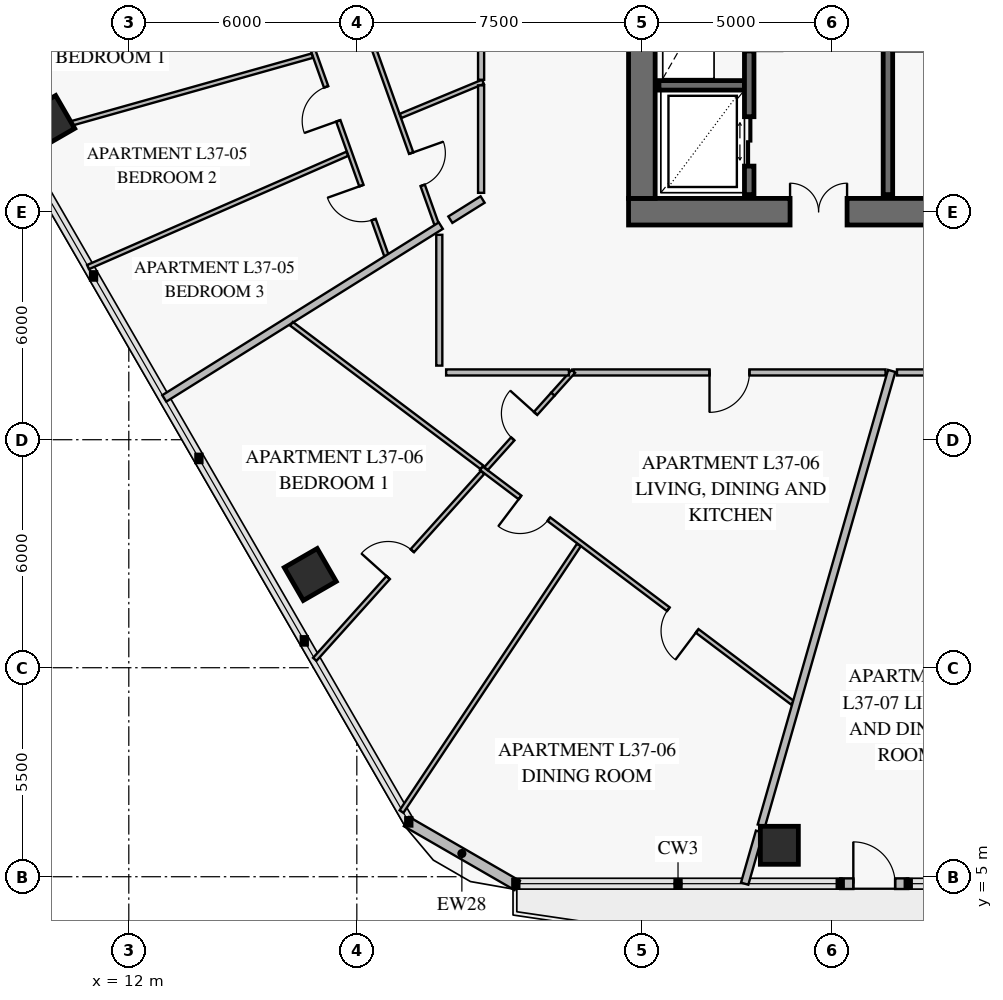
"""IFC4 building model, lengths in metres.
Left out: names, types, materials, properties, quantities, classifications, styles, units other than length and angle.
Written with IfcOpenShell. Run it as: python <this file> out.ifc"""

import sys

from ifc_helpers import new_model, si_unit, direction, frame, frame_2d, origin, origin_2d, place, context, subcontext, project, spatial, rectangle, extrude, element, fill, save


model = new_model("IFC4")
c1 = context("Model", 3, precision=1e-05, world=origin(), true_north=direction((0.0, 1.0)))
c2 = subcontext(c1, "Body", "Model", "MODEL_VIEW")
j1 = project(units=[si_unit("LENGTHUNIT", "METRE"), si_unit("PLANEANGLEUNIT", "RADIAN")], contexts=[c1])
p1 = place(None, origin())
s1 = spatial("IfcSite", under=j1, at=p1, CompositionType="ELEMENT")
p2 = place(p1, origin())
s2 = spatial("IfcBuilding", under=s1, at=p2, CompositionType="ELEMENT")
p3 = place(p2, frame((0.0, 0.0, 150.4)))
s3 = spatial("IfcBuildingStorey", under=s2, at=p3, CompositionType="ELEMENT", Elevation=150.4)
p4 = place(p3, frame((25.15, 22.5, 0.0), z_axis=(0.0, 0.0, 1.0), x_axis=(1.0, 0.0, 0.0)))
e1 = element("IfcWall", 1, at=p4, inside=s3, PredefinedType="SHEAR", context=c2, shape_type="SweptSolid", body=[
    extrude(rectangle(XDim=9.9, YDim=0.7, at=frame_2d((4.95, 0.0))), origin(), (0.0, 0.0, 1.0), 3.8),
])
p5 = place(p4, frame((4.25, 0.0, 0.0)))
e2 = element("IfcOpeningElement", 2, at=p5, cuts=e1, PredefinedType="OPENING", context=c2, shape_type="SweptSolid", body=[
    extrude(rectangle(XDim=1.5, YDim=2.15, at=frame_2d((0.75, 1.075))), frame((0.0, 0.362, 0.0), z_axis=(0.0, -1.0, 0.0), x_axis=(1.0, 0.0, 0.0)), (0.0, 0.0, 1.0), 0.724),
])
p6 = place(p3, frame((25.5, 22.85, 0.0), z_axis=(0.0, 0.0, 1.0), x_axis=(0.0, 1.0, 0.0)))
e3 = element("IfcWall", 3, at=p6, inside=s3, PredefinedType="SHEAR", context=c2, shape_type="SweptSolid", body=[
    extrude(rectangle(XDim=18.3, YDim=0.7, at=frame_2d((9.15, 0.0))), origin(), (0.0, 0.0, 1.0), 3.8),
])
p7 = place(p6, frame((8.9, 0.0, 0.0)))
e4 = element("IfcOpeningElement", 4, at=p7, cuts=e3, PredefinedType="OPENING", context=c2, shape_type="SweptSolid", body=[
    extrude(rectangle(XDim=1.1, YDim=2.15, at=frame_2d((0.55, 1.075))), frame((0.0, 0.362, 0.0), z_axis=(0.0, -1.0, 0.0), x_axis=(1.0, 0.0, 0.0)), (0.0, 0.0, 1.0), 0.724),
])
for number, where, z_axis, x_axis in (
    (5, (9.892, 24.874, 0.0), (0.0, 0.0, 1.0), (0.5, -0.866, 0.0)),
    (6, (16.774, 12.953, 0.0), (0.0, 0.0, 1.0), (0.5, -0.866, 0.0)),
    (7, (29.118, 5.827, 0.0), (0.0, 0.0, 1.0), (1.0, 0.0, 0.0)),
):
    element("IfcColumn", number, at=place(p3, frame(where, z_axis=z_axis, x_axis=x_axis)), inside=s3, PredefinedType="COLUMN", context=c2, shape_type="SweptSolid", body=[
        extrude(rectangle(XDim=1.0, YDim=1.0, at=origin_2d()), origin(), (0.0, 0.0, 1.0), 3.55),
    ])
p8 = place(p3, frame((32.51, 4.817, 0.0), z_axis=(0.0, 0.0, 1.0), x_axis=(-1.0, 0.0, 0.0)))
e8 = element("IfcWall", 8, at=p8, inside=s3, PredefinedType="SOLIDWALL", context=c2, shape_type="SweptSolid", body=[
    extrude(rectangle(XDim=1.79, YDim=0.28, at=frame_2d((0.895, 0.0))), origin(), (0.0, 0.0, 1.0), 3.55),
])
p9 = place(p8, frame((0.345, 0.0, 0.0)))
e9 = element("IfcOpeningElement", 9, at=p9, cuts=e8, PredefinedType="OPENING", context=c2, shape_type="SweptSolid", body=[
    extrude(rectangle(XDim=1.1, YDim=2.2, at=frame_2d((0.55, 1.1))), frame((0.0, 0.152, 0.0), z_axis=(0.0, -1.0, 0.0), x_axis=(1.0, 0.0, 0.0)), (0.0, 0.0, 1.0), 0.304),
])
p10 = place(p3, frame((22.221, 4.769, 0.0), z_axis=(0.0, 0.0, 1.0), x_axis=(-0.866020068361, 0.500009241111, 0.0)))
e10 = element("IfcWall", 10, at=p10, inside=s3, PredefinedType="SOLIDWALL", context=c2, shape_type="SweptSolid", body=[
    extrude(rectangle(XDim=3.365, YDim=0.28, at=frame_2d((1.683, 0.0))), origin(), (0.0, 0.0, 1.0), 3.55),
])
p11 = place(p3, frame((25.95, 25.825, 0.0), z_axis=(0.0, 0.0, 1.0), x_axis=(1.0, 0.0, 0.0)))
e11 = element("IfcWall", 11, at=p11, inside=s3, PredefinedType="SOLIDWALL", context=c2, shape_type="SweptSolid", body=[
    extrude(rectangle(XDim=2.25, YDim=0.25, at=frame_2d((1.125, 0.0))), origin(), (0.0, 0.0, 1.0), 3.8),
])
p12 = place(p3, frame((28.325, 22.95, 0.0), z_axis=(0.0, 0.0, 1.0), x_axis=(0.0, 1.0, 0.0)))
e12 = element("IfcWall", 12, at=p12, inside=s3, PredefinedType="SOLIDWALL", context=c2, shape_type="SweptSolid", body=[
    extrude(rectangle(XDim=8.2, YDim=0.25, at=frame_2d((4.1, 0.0))), origin(), (0.0, 0.0, 1.0), 3.8),
])
p13 = place(p12, frame((0.75, 0.0, 0.0)))
e13 = element("IfcOpeningElement", 13, at=p13, cuts=e12, PredefinedType="OPENING", context=c2, shape_type="SweptSolid", body=[
    extrude(rectangle(XDim=1.3, YDim=2.3, at=frame_2d((0.65, 1.15))), frame((0.0, 0.137, 0.0), z_axis=(0.0, -1.0, 0.0), x_axis=(1.0, 0.0, 0.0)), (0.0, 0.0, 1.0), 0.274),
])
p14 = place(p12, frame((3.78, 0.0, 0.0)))
e14 = element("IfcOpeningElement", 14, at=p14, cuts=e12, PredefinedType="OPENING", context=c2, shape_type="SweptSolid", body=[
    extrude(rectangle(XDim=0.9, YDim=2.1, at=frame_2d((0.45, 1.05))), frame((0.0, 0.137, 0.0), z_axis=(0.0, -1.0, 0.0), x_axis=(1.0, 0.0, 0.0)), (0.0, 0.0, 1.0), 0.274),
])
p15 = place(p12, frame((6.5, 0.0, 0.0)))
e15 = element("IfcOpeningElement", 15, at=p15, cuts=e12, PredefinedType="OPENING", context=c2, shape_type="SweptSolid", body=[
    extrude(rectangle(XDim=0.9, YDim=2.1, at=frame_2d((0.45, 1.05))), frame((0.0, 0.137, 0.0), z_axis=(0.0, -1.0, 0.0), x_axis=(1.0, 0.0, 0.0)), (0.0, 0.0, 1.0), 0.274),
])
p16 = place(p3, frame((31.975, 22.95, 0.0), z_axis=(0.0, 0.0, 1.0), x_axis=(0.0, 1.0, 0.0)))
e16 = element("IfcWall", 16, at=p16, inside=s3, PredefinedType="SOLIDWALL", context=c2, shape_type="SweptSolid", body=[
    extrude(rectangle(XDim=8.2, YDim=0.25, at=frame_2d((4.1, 0.0))), origin(), (0.0, 0.0, 1.0), 3.8),
])
p17 = place(p3, frame((17.46, 29.555, 0.0), z_axis=(0.0, 0.0, 1.0), x_axis=(0.336444483984, -0.941703302106, 0.0)))
e17 = element("IfcWall", 17, at=p17, inside=s3, PredefinedType="PARTITIONING", context=c2, shape_type="SweptSolid", body=[
    extrude(rectangle(XDim=7.87, YDim=0.12, at=frame_2d((3.935, 0.0))), origin(), (0.0, 0.0, 1.0), 2.9),
])
p18 = place(p17, frame((1.997, 0.0, 0.0)))
e18 = element("IfcOpeningElement", 18, at=p18, cuts=e17, PredefinedType="OPENING", context=c2, shape_type="SweptSolid", body=[
    extrude(rectangle(XDim=0.95, YDim=2.1, at=frame_2d((0.475, 1.05))), frame((0.0, 0.072, 0.0), z_axis=(0.0, -1.0, 0.0), x_axis=(1.0, 0.0, 0.0)), (0.0, 0.0, 1.0), 0.144),
])
p19 = place(p17, frame((5.855, 0.0, 0.0)))
e19 = element("IfcOpeningElement", 19, at=p19, cuts=e17, PredefinedType="OPENING", context=c2, shape_type="SweptSolid", body=[
    extrude(rectangle(XDim=0.9, YDim=2.1, at=frame_2d((0.45, 1.05))), frame((0.0, 0.072, 0.0), z_axis=(0.0, -1.0, 0.0), x_axis=(1.0, 0.0, 0.0)), (0.0, 0.0, 1.0), 0.144),
])
p20 = place(p3, frame((15.921, 29.343, 0.0), z_axis=(0.0, 0.0, 1.0), x_axis=(0.336440023532, -0.941704895689, 0.0)))
e20 = element("IfcWall", 20, at=p20, inside=s3, PredefinedType="PARTITIONING", context=c2, shape_type="SweptSolid", body=[
    extrude(rectangle(XDim=8.507, YDim=0.12, at=frame_2d((4.253, 0.0))), origin(), (0.0, 0.0, 1.0), 2.9),
])
p21 = place(p20, frame((1.019, 0.0, 0.0)))
e21 = element("IfcOpeningElement", 21, at=p21, cuts=e20, PredefinedType="OPENING", context=c2, shape_type="SweptSolid", body=[
    extrude(rectangle(XDim=0.95, YDim=2.1, at=frame_2d((0.475, 1.05))), frame((0.0, 0.072, 0.0), z_axis=(0.0, -1.0, 0.0), x_axis=(1.0, 0.0, 0.0)), (0.0, 0.0, 1.0), 0.144),
])
p22 = place(p20, frame((3.779, 0.0, 0.0)))
e22 = element("IfcOpeningElement", 22, at=p22, cuts=e20, PredefinedType="OPENING", context=c2, shape_type="SweptSolid", body=[
    extrude(rectangle(XDim=0.95, YDim=2.1, at=frame_2d((0.475, 1.05))), frame((0.0, 0.072, 0.0), z_axis=(0.0, -1.0, 0.0), x_axis=(1.0, 0.0, 0.0)), (0.0, 0.0, 1.0), 0.144),
])
p23 = place(p20, frame((6.538, 0.0, 0.0)))
e23 = element("IfcOpeningElement", 23, at=p23, cuts=e20, PredefinedType="OPENING", context=c2, shape_type="SweptSolid", body=[
    extrude(rectangle(XDim=0.95, YDim=2.1, at=frame_2d((0.475, 1.05))), frame((0.0, 0.072, 0.0), z_axis=(0.0, -1.0, 0.0), x_axis=(1.0, 0.0, 0.0)), (0.0, 0.0, 1.0), 0.144),
])
p24 = place(p3, frame((21.274, 15.749, 0.0), z_axis=(0.0, 0.0, 1.0), x_axis=(0.798637831458, -0.601811942524, 0.0)))
e24 = element("IfcWall", 24, at=p24, inside=s3, PredefinedType="PARTITIONING", context=c2, shape_type="SweptSolid", body=[
    extrude(rectangle(XDim=10.253, YDim=0.12, at=frame_2d((5.126, 0.0))), origin(), (0.0, 0.0, 1.0), 3.55),
])
p25 = place(p24, frame((1.277, 0.0, 0.0)))
e25 = element("IfcOpeningElement", 25, at=p25, cuts=e24, PredefinedType="OPENING", context=c2, shape_type="SweptSolid", body=[
    extrude(rectangle(XDim=0.95, YDim=2.1, at=frame_2d((0.475, 1.05))), frame((0.0, 0.072, 0.0), z_axis=(0.0, -1.0, 0.0), x_axis=(1.0, 0.0, 0.0)), (0.0, 0.0, 1.0), 0.144),
])
p26 = place(p24, frame((6.163, 0.0, 0.0)))
e26 = element("IfcOpeningElement", 26, at=p26, cuts=e24, PredefinedType="OPENING", context=c2, shape_type="SweptSolid", body=[
    extrude(rectangle(XDim=0.95, YDim=2.1, at=frame_2d((0.475, 1.05))), frame((0.0, 0.072, 0.0), z_axis=(0.0, -1.0, 0.0), x_axis=(1.0, 0.0, 0.0)), (0.0, 0.0, 1.0), 0.144),
])
p27 = place(p3, frame((23.16, 17.7, 0.0), z_axis=(0.0, 0.0, 1.0), x_axis=(-0.668093965752, -0.744076913313, 0.0)))
e27 = element("IfcWall", 27, at=p27, inside=s3, PredefinedType="PARTITIONING", context=c2, shape_type="SweptSolid", body=[
    extrude(rectangle(XDim=2.635, YDim=0.12, at=frame_2d((1.317, 0.0))), origin(), (0.0, 0.0, 1.0), 3.55),
])
p28 = place(p27, frame((0.683, 0.0, 0.0)))
e28 = element("IfcOpeningElement", 28, at=p28, cuts=e27, PredefinedType="OPENING", context=c2, shape_type="SweptSolid", body=[
    extrude(rectangle(XDim=0.9, YDim=2.1, at=frame_2d((0.45, 1.05))), frame((0.0, 0.072, 0.0), z_axis=(0.0, -1.0, 0.0), x_axis=(1.0, 0.0, 0.0)), (0.0, 0.0, 1.0), 0.144),
])
p29 = place(p3, frame((21.309, 15.638, 0.0), z_axis=(0.0, 0.0, 1.0), x_axis=(-0.668094908061, -0.744076067229, 0.0)))
e29 = element("IfcWall", 29, at=p29, inside=s3, PredefinedType="PARTITIONING", context=c2, shape_type="SweptSolid", body=[
    extrude(rectangle(XDim=6.61, YDim=0.12, at=frame_2d((3.305, 0.0))), origin(), (0.0, 0.0, 1.0), 2.87),
])
p30 = place(p29, frame((2.768, 0.0, 0.0)))
e30 = element("IfcOpeningElement", 30, at=p30, cuts=e29, PredefinedType="OPENING", context=c2, shape_type="SweptSolid", body=[
    extrude(rectangle(XDim=0.95, YDim=2.1, at=frame_2d((0.475, 1.05))), frame((0.0, 0.072, 0.0), z_axis=(0.0, -1.0, 0.0), x_axis=(1.0, 0.0, 0.0)), (0.0, 0.0, 1.0), 0.144),
])
p31 = place(p3, frame((23.699, 18.27, 0.0), z_axis=(0.0, 0.0, 1.0), x_axis=(1.0, 0.0, 0.0)))
e31 = element("IfcWall", 31, at=p31, inside=s3, PredefinedType="PARTITIONING", context=c2, shape_type="SweptSolid", body=[
    extrude(rectangle(XDim=8.213, YDim=0.16, at=frame_2d((4.106, 0.0))), origin(), (0.0, 0.0, 1.0), 3.55),
])
p32 = place(p31, frame((3.582, 0.0, 0.0)))
e32 = element("IfcOpeningElement", 32, at=p32, cuts=e31, PredefinedType="OPENING", context=c2, shape_type="SweptSolid", body=[
    extrude(rectangle(XDim=1.05, YDim=2.15, at=frame_2d((0.525, 1.075))), frame((0.0, 0.092, 0.0), z_axis=(0.0, -1.0, 0.0), x_axis=(1.0, 0.0, 0.0)), (0.0, 0.0, 1.0), 0.184),
])
p33 = place(p3, frame((32.213, 18.27, 0.0), z_axis=(0.0, 0.0, 1.0), x_axis=(1.0, 0.0, 0.0)))
e33 = element("IfcWall", 33, at=p33, inside=s3, PredefinedType="PARTITIONING", context=c2, shape_type="SweptSolid", body=[
    extrude(rectangle(XDim=3.244, YDim=0.16, at=frame_2d((1.622, 0.0))), origin(), (0.0, 0.0, 1.0), 2.9),
])
p34 = place(p33, frame((1.097, 0.0, 0.0)))
e34 = element("IfcOpeningElement", 34, at=p34, cuts=e33, PredefinedType="OPENING", context=c2, shape_type="SweptSolid", body=[
    extrude(rectangle(XDim=1.05, YDim=2.15, at=frame_2d((0.525, 1.075))), frame((0.0, 0.092, 0.0), z_axis=(0.0, -1.0, 0.0), x_axis=(1.0, 0.0, 0.0)), (0.0, 0.0, 1.0), 0.184),
])
p35 = place(p3, frame((21.32, 25.919, 0.0), z_axis=(0.0, 0.0, 1.0), x_axis=(-0.923865947443, -0.382716227975, 0.0)))
e35 = element("IfcWall", 35, at=p35, inside=s3, PredefinedType="PARTITIONING", context=c2, shape_type="SweptSolid", body=[
    extrude(rectangle(XDim=2.347, YDim=0.12, at=frame_2d((1.173, 0.0))), origin(), (0.0, 0.0, 1.0), 3.55),
])
p36 = place(p3, frame((16.827, 26.606, 0.0), z_axis=(0.0, 0.0, 1.0), x_axis=(-0.96262766067, -0.270828334767, 0.0)))
e36 = element("IfcWall", 36, at=p36, inside=s3, PredefinedType="PARTITIONING", context=c2, shape_type="SweptSolid", body=[
    extrude(rectangle(XDim=6.664, YDim=0.12, at=frame_2d((3.332, 0.0))), origin(), (0.0, 0.0, 1.0), 2.9),
])
p37 = place(p3, frame((17.749, 24.024, 0.0), z_axis=(0.0, 0.0, 1.0), x_axis=(-0.916318302779, -0.40045070607, 0.0)))
e37 = element("IfcWall", 37, at=p37, inside=s3, PredefinedType="PARTITIONING", context=c2, shape_type="SweptSolid", body=[
    extrude(rectangle(XDim=7.446, YDim=0.12, at=frame_2d((3.723, 0.0))), origin(), (0.0, 0.0, 1.0), 2.87),
])
p38 = place(p3, frame((21.31, 22.821, 0.0), z_axis=(0.0, 0.0, 1.0), x_axis=(-0.848039384523, -0.529933205506, 0.0)))
e38 = element("IfcWall", 38, at=p38, inside=s3, PredefinedType="PARTITIONING", context=c2, shape_type="SweptSolid", body=[
    extrude(rectangle(XDim=1.001, YDim=0.2, at=frame_2d((0.501, 0.0))), origin(), (0.0, 0.0, 1.0), 3.55),
])
p39 = place(p3, frame((20.21, 22.133, 0.0), z_axis=(0.0, 0.0, 1.0), x_axis=(-0.848051050333, -0.529914536534, 0.0)))
e39 = element("IfcWall", 39, at=p39, inside=s3, PredefinedType="PARTITIONING", context=c2, shape_type="SweptSolid", body=[
    extrude(rectangle(XDim=8.58, YDim=0.2, at=frame_2d((4.29, 0.0))), origin(), (0.0, 0.0, 1.0), 2.87),
])
p40 = place(p3, frame((23.843, 13.729, 0.0), z_axis=(0.0, 0.0, 1.0), x_axis=(-0.553937627107, -0.832558169304, 0.0)))
e40 = element("IfcWall", 40, at=p40, inside=s3, PredefinedType="PARTITIONING", context=c2, shape_type="SweptSolid", body=[
    extrude(rectangle(XDim=8.425, YDim=0.12, at=frame_2d((4.212, 0.0))), origin(), (0.0, 0.0, 1.0), 2.87),
])
p41 = place(p3, frame((23.699, 18.3, 0.0), z_axis=(0.0, 0.0, 1.0), x_axis=(-0.668077469972, -0.744091724262, 0.0)))
e41 = element("IfcWall", 41, at=p41, inside=s3, PredefinedType="PARTITIONING", context=c2, shape_type="SweptSolid", body=[
    extrude(rectangle(XDim=0.806, YDim=0.12, at=frame_2d((0.403, 0.0))), origin(), (0.0, 0.0, 1.0), 3.55),
])
p42 = place(p3, frame((16.281, 19.551, 0.0), z_axis=(0.0, 0.0, 1.0), x_axis=(0.798630108131, -0.60182219167, 0.0)))
e42 = element("IfcWall", 42, at=p42, inside=s3, PredefinedType="PARTITIONING", context=c2, shape_type="SweptSolid", body=[
    extrude(rectangle(XDim=6.276, YDim=0.12, at=frame_2d((3.138, 0.0))), origin(), (0.0, 0.0, 1.0), 2.9),
])
p43 = place(p3, frame((32.074, 18.31, 0.0), z_axis=(0.0, 0.0, 1.0), x_axis=(-0.275640788156, -0.961260711724, 0.0)))
e43 = element("IfcWall", 43, at=p43, inside=s3, PredefinedType="PARTITIONING", context=c2, shape_type="SweptSolid", body=[
    extrude(rectangle(XDim=12.445, YDim=0.2, at=frame_2d((6.223, 0.0))), origin(), (0.0, 0.0, 1.0), 3.55),
])
p44 = place(p3, frame((28.598, 6.186, 0.0), z_axis=(0.0, 0.0, 1.0), x_axis=(-0.275581158173, -0.961277808576, 0.0)))
e44 = element("IfcWall", 44, at=p44, inside=s3, PredefinedType="PARTITIONING", context=c2, shape_type="SweptSolid", body=[
    extrude(rectangle(XDim=1.425, YDim=0.2, at=frame_2d((0.712, 0.0))), origin(), (0.0, 0.0, 1.0), 2.87),
])
p45 = place(p3, frame((21.27, 29.908, 0.0), z_axis=(0.0, 0.0, 1.0), x_axis=(0.0, -1.0, 0.0)))
e45 = element("IfcWall", 45, at=p45, inside=s3, PredefinedType="PARTITIONING", context=c2, shape_type="SweptSolid", body=[
    extrude(rectangle(XDim=3.937, YDim=0.16, at=frame_2d((1.968, 0.0))), origin(), (0.0, 0.0, 1.0), 2.9),
])
p46 = place(p3, frame((21.27, 25.825, 0.0), z_axis=(0.0, 0.0, 1.0), x_axis=(0.0, -1.0, 0.0)))
e46 = element("IfcWall", 46, at=p46, inside=s3, PredefinedType="PARTITIONING", context=c2, shape_type="SweptSolid", body=[
    extrude(rectangle(XDim=2.828, YDim=0.16, at=frame_2d((1.414, 0.0))), origin(), (0.0, 0.0, 1.0), 3.55),
])
p47 = place(p3, frame((20.17, 21.892, 0.0), z_axis=(0.0, 0.0, 1.0), x_axis=(0.0, -1.0, 0.0)))
e47 = element("IfcWall", 47, at=p47, inside=s3, PredefinedType="PARTITIONING", context=c2, shape_type="SweptSolid", body=[
    extrude(rectangle(XDim=3.442, YDim=0.16, at=frame_2d((1.721, 0.0))), origin(), (0.0, 0.0, 1.0), 3.15),
])
p48 = place(p3, frame((20.35, 18.27, 0.0), z_axis=(0.0, 0.0, 1.0), x_axis=(1.0, 0.0, 0.0)))
e48 = element("IfcWall", 48, at=p48, inside=s3, PredefinedType="PARTITIONING", context=c2, shape_type="SweptSolid", body=[
    extrude(rectangle(XDim=3.231, YDim=0.16, at=frame_2d((1.615, 0.0))), origin(), (0.0, 0.0, 1.0), 2.9),
])
p49 = place(p9, frame((1.1, 0.0, 0.0), z_axis=(0.0, 0.0, 1.0), x_axis=(-1.0, 0.0, 0.0)))
e49 = element("IfcDoor", 49, at=p49, inside=s3, OperationType="SINGLE_SWING_LEFT", PredefinedType="DOOR", context=c2, shape_type="SweptSolid", body=[
    extrude(rectangle(XDim=1.1, YDim=2.2, at=frame_2d((0.55, 1.1))), frame((0.0, 0.025, 0.0), z_axis=(0.0, -1.0, 0.0), x_axis=(1.0, 0.0, 0.0)), (0.0, 0.0, 1.0), 0.05),
])
fill(e9, e49)
p50 = place(p5, origin())
e50 = element("IfcDoor", 50, at=p50, inside=s3, OperationType="DOUBLE_DOOR_SINGLE_SWING", PredefinedType="DOOR", context=c2, shape_type="SweptSolid", body=[
    extrude(rectangle(XDim=1.5, YDim=2.15, at=frame_2d((0.75, 1.075))), frame((0.0, 0.025, 0.0), z_axis=(0.0, -1.0, 0.0), x_axis=(1.0, 0.0, 0.0)), (0.0, 0.0, 1.0), 0.05),
])
fill(e2, e50)
p51 = place(p13, frame((1.3, 0.0, 0.0), z_axis=(0.0, 0.0, 1.0), x_axis=(-1.0, 0.0, 0.0)))
e51 = element("IfcDoor", 51, at=p51, inside=s3, OperationType="DOUBLE_DOOR_SLIDING", PredefinedType="DOOR", context=c2, shape_type="SweptSolid", body=[
    extrude(rectangle(XDim=1.3, YDim=2.3, at=frame_2d((0.65, 1.15))), frame((0.0, 0.025, 0.0), z_axis=(0.0, -1.0, 0.0), x_axis=(1.0, 0.0, 0.0)), (0.0, 0.0, 1.0), 0.05),
])
fill(e13, e51)
p52 = place(p19, origin())
e52 = element("IfcDoor", 52, at=p52, inside=s3, OperationType="SINGLE_SWING_LEFT", PredefinedType="DOOR", context=c2, shape_type="SweptSolid", body=[
    extrude(rectangle(XDim=0.9, YDim=2.1, at=frame_2d((0.45, 1.05))), frame((0.0, 0.025, 0.0), z_axis=(0.0, -1.0, 0.0), x_axis=(1.0, 0.0, 0.0)), (0.0, 0.0, 1.0), 0.05),
])
fill(e19, e52)
p53 = place(p22, frame((0.95, 0.0, 0.0), z_axis=(0.0, 0.0, 1.0), x_axis=(-1.0, 0.0, 0.0)))
e53 = element("IfcDoor", 53, at=p53, inside=s3, OperationType="SINGLE_SWING_LEFT", PredefinedType="DOOR", context=c2, shape_type="SweptSolid", body=[
    extrude(rectangle(XDim=0.95, YDim=2.1, at=frame_2d((0.475, 1.05))), frame((0.0, 0.025, 0.0), z_axis=(0.0, -1.0, 0.0), x_axis=(1.0, 0.0, 0.0)), (0.0, 0.0, 1.0), 0.05),
])
fill(e22, e53)
p54 = place(p23, frame((0.95, 0.0, 0.0), z_axis=(0.0, 0.0, 1.0), x_axis=(-1.0, 0.0, 0.0)))
e54 = element("IfcDoor", 54, at=p54, inside=s3, OperationType="SINGLE_SWING_RIGHT", PredefinedType="DOOR", context=c2, shape_type="SweptSolid", body=[
    extrude(rectangle(XDim=0.95, YDim=2.1, at=frame_2d((0.475, 1.05))), frame((0.0, 0.025, 0.0), z_axis=(0.0, -1.0, 0.0), x_axis=(1.0, 0.0, 0.0)), (0.0, 0.0, 1.0), 0.05),
])
fill(e23, e54)
p55 = place(p25, frame((0.95, 0.0, 0.0), z_axis=(0.0, 0.0, 1.0), x_axis=(-1.0, 0.0, 0.0)))
e55 = element("IfcDoor", 55, at=p55, inside=s3, OperationType="SINGLE_SWING_RIGHT", PredefinedType="DOOR", context=c2, shape_type="SweptSolid", body=[
    extrude(rectangle(XDim=0.95, YDim=2.1, at=frame_2d((0.475, 1.05))), frame((0.0, 0.025, 0.0), z_axis=(0.0, -1.0, 0.0), x_axis=(1.0, 0.0, 0.0)), (0.0, 0.0, 1.0), 0.05),
])
fill(e25, e55)
p56 = place(p26, frame((0.95, 0.0, 0.0), z_axis=(0.0, 0.0, 1.0), x_axis=(-1.0, 0.0, 0.0)))
e56 = element("IfcDoor", 56, at=p56, inside=s3, OperationType="SINGLE_SWING_LEFT", PredefinedType="DOOR", context=c2, shape_type="SweptSolid", body=[
    extrude(rectangle(XDim=0.95, YDim=2.1, at=frame_2d((0.475, 1.05))), frame((0.0, 0.025, 0.0), z_axis=(0.0, -1.0, 0.0), x_axis=(1.0, 0.0, 0.0)), (0.0, 0.0, 1.0), 0.05),
])
fill(e26, e56)
p57 = place(p28, frame((0.9, 0.0, 0.0), z_axis=(0.0, 0.0, 1.0), x_axis=(-1.0, 0.0, 0.0)))
e57 = element("IfcDoor", 57, at=p57, inside=s3, OperationType="SINGLE_SWING_RIGHT", PredefinedType="DOOR", context=c2, shape_type="SweptSolid", body=[
    extrude(rectangle(XDim=0.9, YDim=2.1, at=frame_2d((0.45, 1.05))), frame((0.0, 0.025, 0.0), z_axis=(0.0, -1.0, 0.0), x_axis=(1.0, 0.0, 0.0)), (0.0, 0.0, 1.0), 0.05),
])
fill(e28, e57)
p58 = place(p30, frame((0.95, 0.0, 0.0), z_axis=(0.0, 0.0, 1.0), x_axis=(-1.0, 0.0, 0.0)))
e58 = element("IfcDoor", 58, at=p58, inside=s3, OperationType="SINGLE_SWING_LEFT", PredefinedType="DOOR", context=c2, shape_type="SweptSolid", body=[
    extrude(rectangle(XDim=0.95, YDim=2.1, at=frame_2d((0.475, 1.05))), frame((0.0, 0.025, 0.0), z_axis=(0.0, -1.0, 0.0), x_axis=(1.0, 0.0, 0.0)), (0.0, 0.0, 1.0), 0.05),
])
fill(e30, e58)
p59 = place(p32, frame((1.05, 0.0, 0.0), z_axis=(0.0, 0.0, 1.0), x_axis=(-1.0, 0.0, 0.0)))
e59 = element("IfcDoor", 59, at=p59, inside=s3, OperationType="SINGLE_SWING_RIGHT", PredefinedType="DOOR", context=c2, shape_type="SweptSolid", body=[
    extrude(rectangle(XDim=1.05, YDim=2.15, at=frame_2d((0.525, 1.075))), frame((0.0, 0.025, 0.0), z_axis=(0.0, -1.0, 0.0), x_axis=(1.0, 0.0, 0.0)), (0.0, 0.0, 1.0), 0.05),
])
fill(e32, e59)
save(model, sys.argv[1])
